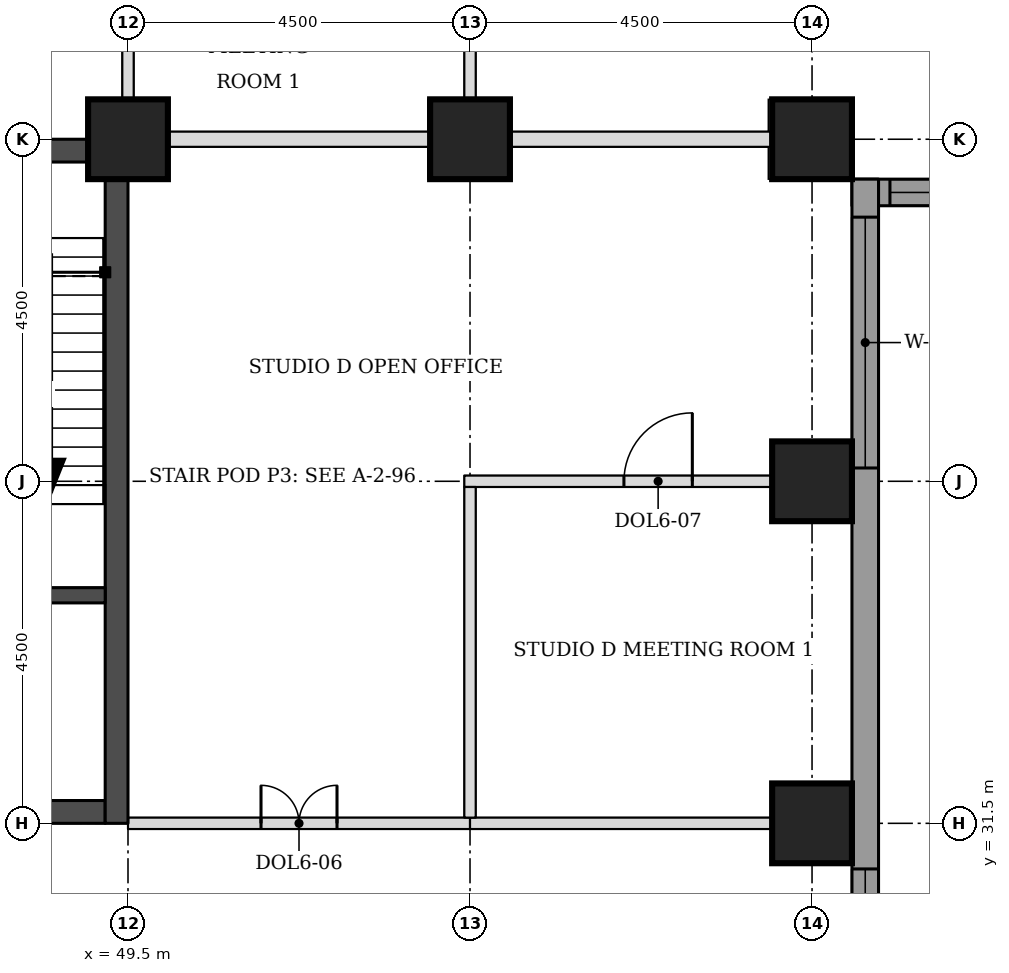
"""IFC4 building model, lengths in metres.
Left out: names, types, materials, properties, quantities, classifications, styles, units other than length and angle.
Written with IfcOpenShell. Run it as: python <this file> out.ifc"""

import sys

from ifc_helpers import new_model, si_unit, direction, frame, frame_2d, origin, origin_2d, place, context, subcontext, project, spatial, rectangle, extrude, element, fill, save


model = new_model("IFC4")
c1 = context("Model", 3, precision=1e-05, world=origin(), true_north=direction((0.0, 1.0)))
c2 = subcontext(c1, "Body", "Model", "MODEL_VIEW")
j1 = project(units=[si_unit("LENGTHUNIT", "METRE"), si_unit("PLANEANGLEUNIT", "RADIAN")], contexts=[c1])
p1 = place(None, origin())
s1 = spatial("IfcSite", under=j1, at=p1, CompositionType="ELEMENT")
p2 = place(p1, origin())
s2 = spatial("IfcBuilding", under=s1, at=p2, CompositionType="ELEMENT")
p3 = place(p2, frame((0.0, 0.0, 115.9)))
s3 = spatial("IfcBuildingStorey", under=s2, at=p3, CompositionType="ELEMENT", Elevation=115.9)
for number, where, z_axis, x_axis in (
    (1, (58.5, 31.5, 0.0), (0.0, 0.0, 1.0), (1.0, 0.0, 0.0)),
    (2, (58.5, 36.0, 0.0), (0.0, 0.0, 1.0), (1.0, 0.0, 0.0)),
    (3, (49.5, 40.5, 0.0), (0.0, 0.0, 1.0), (1.0, 0.0, 0.0)),
    (4, (54.0, 40.5, 0.0), (0.0, 0.0, 1.0), (1.0, 0.0, 0.0)),
    (5, (58.5, 40.5, 0.0), (0.0, 0.0, 1.0), (1.0, 0.0, 0.0)),
):
    element("IfcColumn", number, at=place(p3, frame(where, z_axis=z_axis, x_axis=x_axis)), inside=s3, PredefinedType="COLUMN", context=c2, shape_type="SweptSolid", body=[
        extrude(rectangle(XDim=1.05, YDim=1.05, at=origin_2d()), origin(), (0.0, 0.0, 1.0), 3.7),
    ])
p4 = place(p3, frame((40.8, 31.65, 0.0), z_axis=(0.0, 0.0, 1.0), x_axis=(1.0, 0.0, 0.0)))
e6 = element("IfcWall", 6, at=p4, inside=s3, PredefinedType="SHEAR", context=c2, shape_type="SweptSolid", body=[
    extrude(rectangle(XDim=8.4, YDim=0.3, at=frame_2d((4.2, 0.0))), origin(), (0.0, 0.0, 1.0), 3.7),
])
p5 = place(p4, frame((5.2, 0.0, 0.0)))
e7 = element("IfcOpeningElement", 7, at=p5, cuts=e6, PredefinedType="OPENING", context=c2, shape_type="SweptSolid", body=[
    extrude(rectangle(XDim=1.0, YDim=2.1, at=frame_2d((0.5, 1.05))), frame((0.0, 0.16, 0.0), z_axis=(0.0, -1.0, 0.0), x_axis=(1.0, 0.0, 0.0)), (0.0, 0.0, 1.0), 0.32),
])
p6 = place(p3, frame((40.8, 40.35, 0.0), z_axis=(0.0, 0.0, 1.0), x_axis=(1.0, 0.0, 0.0)))
e8 = element("IfcWall", 8, at=p6, inside=s3, PredefinedType="SHEAR", context=c2, shape_type="SweptSolid", body=[
    extrude(rectangle(XDim=8.4, YDim=0.3, at=frame_2d((4.2, 0.0))), origin(), (0.0, 0.0, 1.0), 3.7),
])
p7 = place(p6, frame((6.4, 0.0, 0.0)))
e9 = element("IfcOpeningElement", 9, at=p7, cuts=e8, PredefinedType="OPENING", context=c2, shape_type="SweptSolid", body=[
    extrude(rectangle(XDim=1.1, YDim=2.1, at=frame_2d((0.55, 1.05))), frame((0.0, 0.16, 0.0), z_axis=(0.0, -1.0, 0.0), x_axis=(1.0, 0.0, 0.0)), (0.0, 0.0, 1.0), 0.32),
])
p8 = place(p3, frame((49.35, 31.5, 0.0), z_axis=(0.0, 0.0, 1.0), x_axis=(0.0, 1.0, 0.0)))
e10 = element("IfcWall", 10, at=p8, inside=s3, PredefinedType="SHEAR", context=c2, shape_type="SweptSolid", body=[
    extrude(rectangle(XDim=9.0, YDim=0.3, at=frame_2d((4.5, 0.0))), origin(), (0.0, 0.0, 1.0), 3.7),
])
p9 = place(p3, frame((59.025, 39.8, 0.0), z_axis=(0.0, 0.0, 1.0), x_axis=(1.0, 0.0, 0.0)))
e11 = element("IfcWall", 11, at=p9, inside=s3, PredefinedType="STANDARD", context=c2, shape_type="SweptSolid", body=[
    extrude(rectangle(XDim=13.337, YDim=0.35, at=frame_2d((6.669, 0.0))), origin(), (0.0, 0.0, 1.0), 3.525),
])
p10 = place(p9, frame((0.5, 0.0, 0.9)))
e12 = element("IfcOpeningElement", 12, at=p10, cuts=e11, PredefinedType="OPENING", context=c2, shape_type="SweptSolid", body=[
    extrude(rectangle(XDim=3.3, YDim=1.9, at=frame_2d((1.65, 0.95))), frame((0.0, 0.185, 0.0), z_axis=(0.0, -1.0, 0.0), x_axis=(1.0, 0.0, 0.0)), (0.0, 0.0, 1.0), 0.37),
])
p11 = place(p3, frame((59.2, 22.138, 0.0), z_axis=(0.0, 0.0, 1.0), x_axis=(0.0, 1.0, 0.0)))
e13 = element("IfcWall", 13, at=p11, inside=s3, PredefinedType="STANDARD", context=c2, shape_type="SweptSolid", body=[
    extrude(rectangle(XDim=17.837, YDim=0.35, at=frame_2d((8.919, 0.0))), origin(), (0.0, 0.0, 1.0), 3.525),
])
p12 = place(p11, frame((5.462, 0.0, 0.9)))
e14 = element("IfcOpeningElement", 14, at=p12, cuts=e13, PredefinedType="OPENING", context=c2, shape_type="SweptSolid", body=[
    extrude(rectangle(XDim=3.3, YDim=1.9, at=frame_2d((1.65, 0.95))), frame((0.0, 0.185, 0.0), z_axis=(0.0, -1.0, 0.0), x_axis=(1.0, 0.0, 0.0)), (0.0, 0.0, 1.0), 0.37),
])
p13 = place(p11, frame((14.037, 0.0, 0.9)))
e15 = element("IfcOpeningElement", 15, at=p13, cuts=e13, PredefinedType="OPENING", context=c2, shape_type="SweptSolid", body=[
    extrude(rectangle(XDim=3.3, YDim=1.9, at=frame_2d((1.65, 0.95))), frame((0.0, 0.185, 0.0), z_axis=(0.0, -1.0, 0.0), x_axis=(1.0, 0.0, 0.0)), (0.0, 0.0, 1.0), 0.37),
])
p14 = place(p3, frame((49.5, 31.5, 0.0), z_axis=(0.0, 0.0, 1.0), x_axis=(1.0, 0.0, 0.0)))
e16 = element("IfcWall", 16, at=p14, inside=s3, PredefinedType="PARTITIONING", context=c2, shape_type="SweptSolid", body=[
    extrude(rectangle(XDim=4.5, YDim=0.15, at=frame_2d((2.25, 0.0))), origin(), (0.0, 0.0, 1.0), 2.55),
])
p15 = place(p14, frame((1.75, 0.0, 0.0)))
e17 = element("IfcOpeningElement", 17, at=p15, cuts=e16, PredefinedType="OPENING", context=c2, shape_type="SweptSolid", body=[
    extrude(rectangle(XDim=1.0, YDim=2.1, at=frame_2d((0.5, 1.05))), frame((0.0, 0.085, 0.0), z_axis=(0.0, -1.0, 0.0), x_axis=(1.0, 0.0, 0.0)), (0.0, 0.0, 1.0), 0.17),
])
p16 = place(p3, frame((54.0, 31.5, 0.0), z_axis=(0.0, 0.0, 1.0), x_axis=(1.0, 0.0, 0.0)))
e18 = element("IfcWall", 18, at=p16, inside=s3, PredefinedType="PARTITIONING", context=c2, shape_type="SweptSolid", body=[
    extrude(rectangle(XDim=5.025, YDim=0.15, at=frame_2d((2.512, 0.0))), origin(), (0.0, 0.0, 1.0), 2.55),
])
p17 = place(p3, frame((53.925, 36.0, 0.0), z_axis=(0.0, 0.0, 1.0), x_axis=(1.0, 0.0, 0.0)))
e19 = element("IfcWall", 19, at=p17, inside=s3, PredefinedType="PARTITIONING", context=c2, shape_type="SweptSolid", body=[
    extrude(rectangle(XDim=5.1, YDim=0.15, at=frame_2d((2.55, 0.0))), origin(), (0.0, 0.0, 1.0), 3.096),
])
p18 = place(p17, frame((2.1, 0.0, 0.0)))
e20 = element("IfcOpeningElement", 20, at=p18, cuts=e19, PredefinedType="OPENING", context=c2, shape_type="SweptSolid", body=[
    extrude(rectangle(XDim=0.9, YDim=2.1, at=frame_2d((0.45, 1.05))), frame((0.0, 0.085, 0.0), z_axis=(0.0, -1.0, 0.0), x_axis=(1.0, 0.0, 0.0)), (0.0, 0.0, 1.0), 0.17),
])
p19 = place(p3, frame((50.015, 40.5, 0.0), z_axis=(0.0, 0.0, 1.0), x_axis=(1.0, 0.0, 0.0)))
e21 = element("IfcWall", 21, at=p19, inside=s3, PredefinedType="PARTITIONING", context=c2, shape_type="SweptSolid", body=[
    extrude(rectangle(XDim=3.46, YDim=0.2, at=frame_2d((1.73, 0.0))), origin(), (0.0, 0.0, 1.0), 2.8),
])
p20 = place(p3, frame((54.495, 40.5, 0.0), z_axis=(0.0, 0.0, 1.0), x_axis=(1.0, 0.0, 0.0)))
e22 = element("IfcWall", 22, at=p20, inside=s3, PredefinedType="PARTITIONING", context=c2, shape_type="SweptSolid", body=[
    extrude(rectangle(XDim=3.48, YDim=0.2, at=frame_2d((1.74, 0.0))), origin(), (0.0, 0.0, 1.0), 2.8),
])
p21 = place(p3, frame((54.0, 31.575, 0.0), z_axis=(0.0, 0.0, 1.0), x_axis=(0.0, 1.0, 0.0)))
e23 = element("IfcWall", 23, at=p21, inside=s3, PredefinedType="PARTITIONING", context=c2, shape_type="SweptSolid", body=[
    extrude(rectangle(XDim=4.35, YDim=0.15, at=frame_2d((2.175, 0.0))), origin(), (0.0, 0.0, 1.0), 3.55),
])
p22 = place(p3, frame((49.5, 41.025, 0.0), z_axis=(0.0, 0.0, 1.0), x_axis=(0.0, 1.0, 0.0)))
e24 = element("IfcWall", 24, at=p22, inside=s3, PredefinedType="PARTITIONING", context=c2, shape_type="SweptSolid", body=[
    extrude(rectangle(XDim=2.475, YDim=0.15, at=frame_2d((1.238, 0.0))), origin(), (0.0, 0.0, 1.0), 3.55),
])
p23 = place(p3, frame((54.0, 41.025, 0.0), z_axis=(0.0, 0.0, 1.0), x_axis=(0.0, 1.0, 0.0)))
e25 = element("IfcWall", 25, at=p23, inside=s3, PredefinedType="PARTITIONING", context=c2, shape_type="SweptSolid", body=[
    extrude(rectangle(XDim=2.475, YDim=0.15, at=frame_2d((1.238, 0.0))), origin(), (0.0, 0.0, 1.0), 3.55),
])
p24 = place(p23, frame((0.8, 0.0, 0.0)))
e26 = element("IfcOpeningElement", 26, at=p24, cuts=e25, PredefinedType="OPENING", context=c2, shape_type="SweptSolid", body=[
    extrude(rectangle(XDim=0.9, YDim=2.1, at=frame_2d((0.45, 1.05))), frame((0.0, 0.085, 0.0), z_axis=(0.0, -1.0, 0.0), x_axis=(1.0, 0.0, 0.0)), (0.0, 0.0, 1.0), 0.17),
])
p25 = place(p3, frame((46.2, 34.5, 0.0), z_axis=(0.0, 0.0, 1.0), x_axis=(1.0, 0.0, 0.0)))
e27 = element("IfcWall", 27, at=p25, inside=s3, PredefinedType="SOLIDWALL", context=c2, shape_type="SweptSolid", body=[
    extrude(rectangle(XDim=3.0, YDim=0.2, at=frame_2d((1.5, 0.0))), origin(), (0.0, 0.0, 1.0), 3.55),
])
p26 = place(p10, origin())
e28 = element("IfcWindow", 28, at=p26, inside=s3, PartitioningType="SINGLE_PANEL", PredefinedType="WINDOW", context=c2, shape_type="SweptSolid", body=[
    extrude(rectangle(XDim=3.3, YDim=1.9, at=frame_2d((1.65, 0.95))), frame((0.0, 0.085, 0.0), z_axis=(0.0, -1.0, 0.0), x_axis=(1.0, 0.0, 0.0)), (0.0, 0.0, 1.0), 0.06),
])
fill(e12, e28)
p27 = place(p12, origin())
e29 = element("IfcWindow", 29, at=p27, inside=s3, PartitioningType="SINGLE_PANEL", PredefinedType="WINDOW", context=c2, shape_type="SweptSolid", body=[
    extrude(rectangle(XDim=3.3, YDim=1.9, at=frame_2d((1.65, 0.95))), frame((0.0, 0.085, 0.0), z_axis=(0.0, -1.0, 0.0), x_axis=(1.0, 0.0, 0.0)), (0.0, 0.0, 1.0), 0.06),
])
fill(e14, e29)
p28 = place(p13, origin())
e30 = element("IfcWindow", 30, at=p28, inside=s3, PartitioningType="SINGLE_PANEL", PredefinedType="WINDOW", context=c2, shape_type="SweptSolid", body=[
    extrude(rectangle(XDim=3.3, YDim=1.9, at=frame_2d((1.65, 0.95))), frame((0.0, 0.085, 0.0), z_axis=(0.0, -1.0, 0.0), x_axis=(1.0, 0.0, 0.0)), (0.0, 0.0, 1.0), 0.06),
])
fill(e15, e30)
p29 = place(p15, origin())
e31 = element("IfcDoor", 31, at=p29, inside=s3, OperationType="DOUBLE_DOOR_SINGLE_SWING", PredefinedType="DOOR", context=c2, shape_type="SweptSolid", body=[
    extrude(rectangle(XDim=1.0, YDim=2.1, at=frame_2d((0.5, 1.05))), frame((0.0, 0.025, 0.0), z_axis=(0.0, -1.0, 0.0), x_axis=(1.0, 0.0, 0.0)), (0.0, 0.0, 1.0), 0.05),
])
fill(e17, e31)
p30 = place(p18, origin())
e32 = element("IfcDoor", 32, at=p30, inside=s3, OperationType="SINGLE_SWING_RIGHT", PredefinedType="DOOR", context=c2, shape_type="SweptSolid", body=[
    extrude(rectangle(XDim=0.9, YDim=2.1, at=frame_2d((0.45, 1.05))), frame((0.0, 0.025, 0.0), z_axis=(0.0, -1.0, 0.0), x_axis=(1.0, 0.0, 0.0)), (0.0, 0.0, 1.0), 0.05),
])
fill(e20, e32)
save(model, sys.argv[1])
